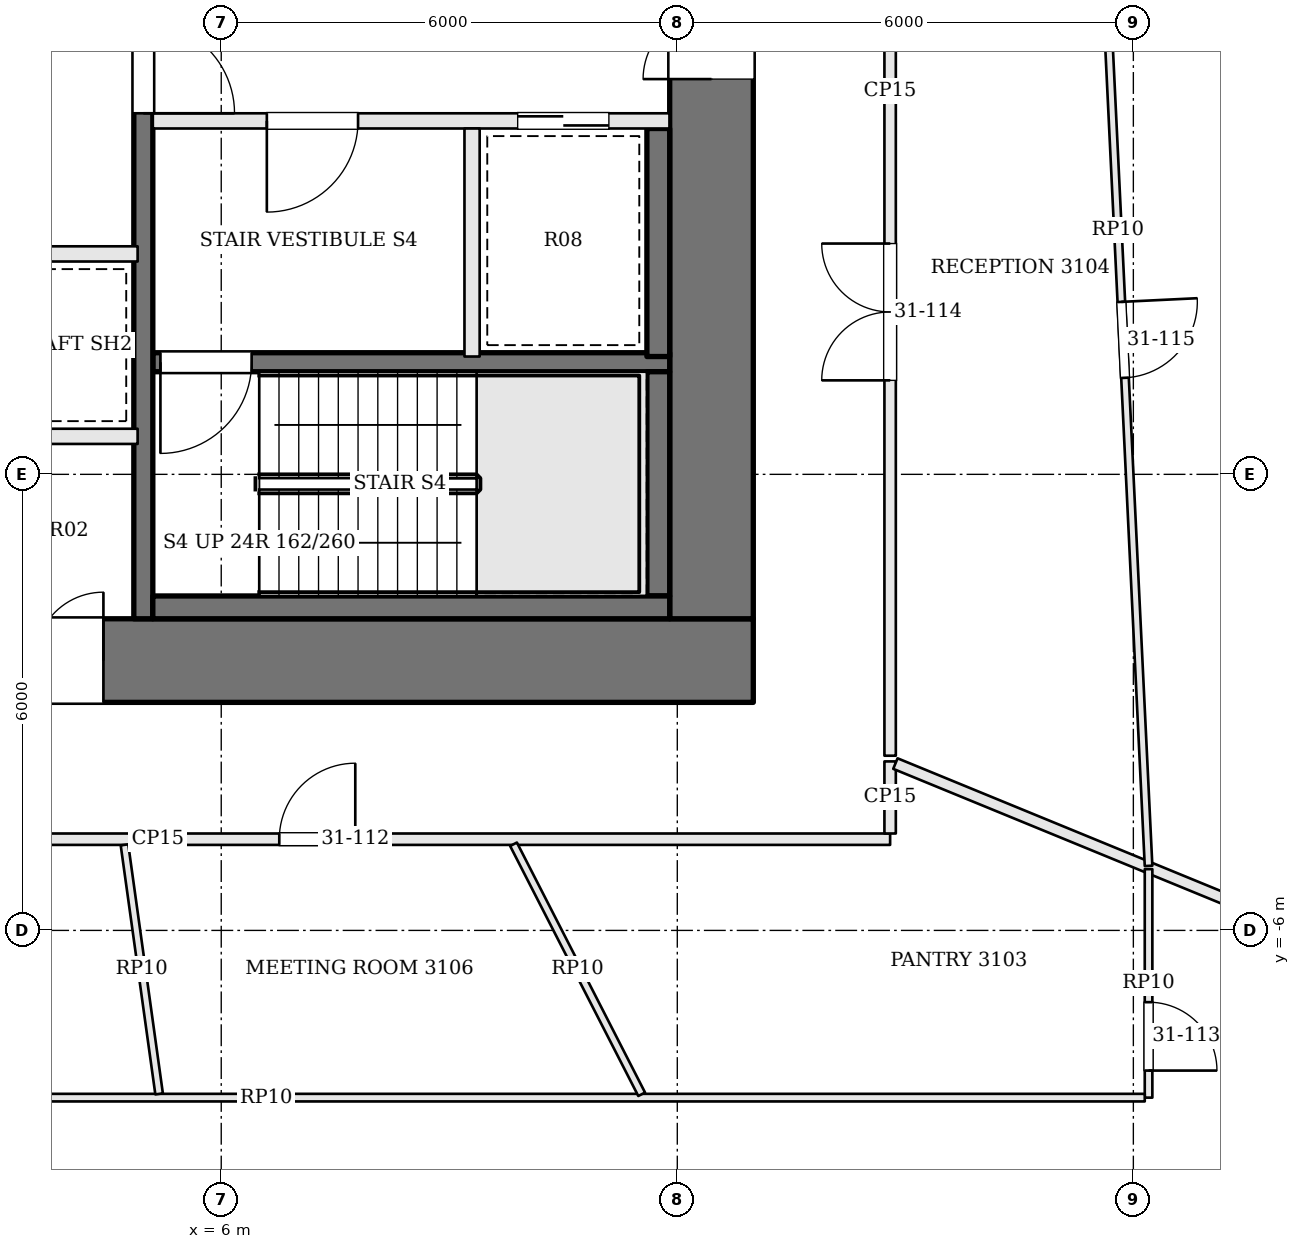
"""IFC4 building model, lengths in metres.
Left out: names, types, materials, properties, quantities, classifications, styles, units other than length and angle.
Written with IfcOpenShell. Run it as: python <this file> out.ifc"""

import sys

from ifc_helpers import new_model, si_unit, direction, frame, frame_2d, origin, place, context, subcontext, project, spatial, rectangle, extrude, element, fill, save


model = new_model("IFC4")
c1 = context("Model", 3, precision=1e-05, world=origin(), true_north=direction((0.0, 1.0)))
c2 = subcontext(c1, "Body", "Model", "MODEL_VIEW")
j1 = project(units=[si_unit("LENGTHUNIT", "METRE"), si_unit("PLANEANGLEUNIT", "RADIAN")], contexts=[c1])
p1 = place(None, origin())
s1 = spatial("IfcSite", under=j1, at=p1, CompositionType="ELEMENT")
p2 = place(p1, origin())
s2 = spatial("IfcBuilding", under=s1, at=p2, CompositionType="ELEMENT")
p3 = place(p2, frame((0.0, 0.0, 130.5)))
s3 = spatial("IfcBuildingStorey", under=s2, at=p3, CompositionType="ELEMENT", Elevation=130.5)
p4 = place(p3, frame((-13.0, -2.45, 0.0), z_axis=(0.0, 0.0, 1.0), x_axis=(1.0, 0.0, 0.0)))
e1 = element("IfcWall", 1, at=p4, inside=s3, PredefinedType="SHEAR", context=c2, shape_type="SweptSolid", body=[
    extrude(rectangle(XDim=26.0, YDim=1.1, at=frame_2d((13.0, 0.0))), origin(), (0.0, 0.0, 1.0), 3.9),
])
p5 = place(p4, frame((9.2, 0.0, 0.0)))
e2 = element("IfcOpeningElement", 2, at=p5, cuts=e1, PredefinedType="OPENING", context=c2, shape_type="SweptSolid", body=[
    extrude(rectangle(XDim=0.9, YDim=2.1, at=frame_2d((0.45, 1.05))), frame((0.0, 0.56, 0.0), z_axis=(0.0, -1.0, 0.0), x_axis=(1.0, 0.0, 0.0)), (0.0, 0.0, 1.0), 1.12),
])
p6 = place(p4, frame((12.3, 0.0, 0.0)))
e3 = element("IfcOpeningElement", 3, at=p6, cuts=e1, PredefinedType="OPENING", context=c2, shape_type="SweptSolid", body=[
    extrude(rectangle(XDim=0.9, YDim=2.1, at=frame_2d((0.45, 1.05))), frame((0.0, 0.56, 0.0), z_axis=(0.0, -1.0, 0.0), x_axis=(1.0, 0.0, 0.0)), (0.0, 0.0, 1.0), 1.12),
])
p7 = place(p4, frame((14.7, 0.0, 0.0)))
e4 = element("IfcOpeningElement", 4, at=p7, cuts=e1, PredefinedType="OPENING", context=c2, shape_type="SweptSolid", body=[
    extrude(rectangle(XDim=1.0, YDim=2.1, at=frame_2d((0.5, 1.05))), frame((0.0, 0.56, 0.0), z_axis=(0.0, -1.0, 0.0), x_axis=(1.0, 0.0, 0.0)), (0.0, 0.0, 1.0), 1.12),
])
p8 = place(p4, frame((16.55, 0.0, 0.0)))
e5 = element("IfcOpeningElement", 5, at=p8, cuts=e1, PredefinedType="OPENING", context=c2, shape_type="SweptSolid", body=[
    extrude(rectangle(XDim=0.9, YDim=2.1, at=frame_2d((0.45, 1.05))), frame((0.0, 0.56, 0.0), z_axis=(0.0, -1.0, 0.0), x_axis=(1.0, 0.0, 0.0)), (0.0, 0.0, 1.0), 1.12),
])
p9 = place(p3, frame((12.45, -1.9, 0.0), z_axis=(0.0, 0.0, 1.0), x_axis=(0.0, 1.0, 0.0)))
e6 = element("IfcWall", 6, at=p9, inside=s3, PredefinedType="SHEAR", context=c2, shape_type="SweptSolid", body=[
    extrude(rectangle(XDim=12.8, YDim=1.1, at=frame_2d((6.4, 0.0))), origin(), (0.0, 0.0, 1.0), 3.9),
])
p10 = place(p9, frame((7.1, 0.0, 0.0)))
e7 = element("IfcOpeningElement", 7, at=p10, cuts=e6, PredefinedType="OPENING", context=c2, shape_type="SweptSolid", body=[
    extrude(rectangle(XDim=1.8, YDim=2.1, at=frame_2d((0.9, 1.05))), frame((0.0, 0.56, 0.0), z_axis=(0.0, -1.0, 0.0), x_axis=(1.0, 0.0, 0.0)), (0.0, 0.0, 1.0), 1.12),
])
p11 = place(p3, frame((11.9, 4.65, 0.0), z_axis=(0.0, 0.0, 1.0), x_axis=(-1.0, 0.0, 0.0)))
e8 = element("IfcWall", 8, at=p11, inside=s3, PredefinedType="SOLIDWALL", context=c2, shape_type="SweptSolid", body=[
    extrude(rectangle(XDim=6.8, YDim=0.2, at=frame_2d((3.4, 0.0))), origin(), (0.0, 0.0, 1.0), 3.7),
])
p12 = place(p11, frame((4.1, 0.0, 0.0)))
e9 = element("IfcOpeningElement", 9, at=p12, cuts=e8, PredefinedType="OPENING", context=c2, shape_type="SweptSolid", body=[
    extrude(rectangle(XDim=1.2, YDim=2.1, at=frame_2d((0.6, 1.05))), frame((0.0, 0.11, 0.0), z_axis=(0.0, -1.0, 0.0), x_axis=(1.0, 0.0, 0.0)), (0.0, 0.0, 1.0), 0.22),
])
p13 = place(p11, frame((0.8, 0.0, 0.0)))
e10 = element("IfcOpeningElement", 10, at=p13, cuts=e8, PredefinedType="OPENING", context=c2, shape_type="SweptSolid", body=[
    extrude(rectangle(XDim=1.2, YDim=2.1, at=frame_2d((0.6, 1.05))), frame((0.0, 0.11, 0.0), z_axis=(0.0, -1.0, 0.0), x_axis=(1.0, 0.0, 0.0)), (0.0, 0.0, 1.0), 0.22),
])
p14 = place(p3, frame((11.9, 1.475, 0.0), z_axis=(0.0, 0.0, 1.0), x_axis=(-1.0, 0.0, 0.0)))
e11 = element("IfcWall", 11, at=p14, inside=s3, PredefinedType="SOLIDWALL", context=c2, shape_type="SweptSolid", body=[
    extrude(rectangle(XDim=6.8, YDim=0.25, at=frame_2d((3.4, 0.0))), origin(), (0.0, 0.0, 1.0), 3.7),
])
p15 = place(p14, frame((5.5, 0.0, 0.0)))
e12 = element("IfcOpeningElement", 12, at=p15, cuts=e11, PredefinedType="OPENING", context=c2, shape_type="SweptSolid", body=[
    extrude(rectangle(XDim=1.2, YDim=2.1, at=frame_2d((0.6, 1.05))), frame((0.0, 0.135, 0.0), z_axis=(0.0, -1.0, 0.0), x_axis=(1.0, 0.0, 0.0)), (0.0, 0.0, 1.0), 0.27),
])
p16 = place(p3, frame((9.3, 4.55, 0.0), z_axis=(0.0, 0.0, 1.0), x_axis=(0.0, -1.0, 0.0)))
e13 = element("IfcWall", 13, at=p16, inside=s3, PredefinedType="SOLIDWALL", context=c2, shape_type="SweptSolid", body=[
    extrude(rectangle(XDim=3.0, YDim=0.2, at=frame_2d((1.5, 0.0))), origin(), (0.0, 0.0, 1.0), 3.7),
])
p17 = place(p3, frame((4.975, 10.9, 0.0), z_axis=(0.0, 0.0, 1.0), x_axis=(0.0, -1.0, 0.0)))
e14 = element("IfcWall", 14, at=p17, inside=s3, PredefinedType="SOLIDWALL", context=c2, shape_type="SweptSolid", body=[
    extrude(rectangle(XDim=12.8, YDim=0.25, at=frame_2d((6.4, 0.0))), origin(), (0.0, 0.0, 1.0), 3.7),
])
p18 = place(p17, frame((4.95, 0.0, 0.0)))
e15 = element("IfcOpeningElement", 15, at=p18, cuts=e14, PredefinedType="OPENING", context=c2, shape_type="SweptSolid", body=[
    extrude(rectangle(XDim=1.2, YDim=2.1, at=frame_2d((0.6, 1.05))), frame((0.0, 0.135, 0.0), z_axis=(0.0, -1.0, 0.0), x_axis=(1.0, 0.0, 0.0)), (0.0, 0.0, 1.0), 0.27),
])
p19 = place(p3, frame((11.75, 4.55, 0.0), z_axis=(0.0, 0.0, 1.0), x_axis=(0.0, -1.0, 0.0)))
e16 = element("IfcWall", 16, at=p19, inside=s3, PredefinedType="SOLIDWALL", context=c2, shape_type="SweptSolid", body=[
    extrude(rectangle(XDim=3.0, YDim=0.3, at=frame_2d((1.5, 0.0))), origin(), (0.0, 0.0, 1.0), 3.7),
])
p20 = place(p3, frame((11.75, 1.35, 0.0), z_axis=(0.0, 0.0, 1.0), x_axis=(0.0, -1.0, 0.0)))
e17 = element("IfcWall", 17, at=p20, inside=s3, PredefinedType="SOLIDWALL", context=c2, shape_type="SweptSolid", body=[
    extrude(rectangle(XDim=2.95, YDim=0.3, at=frame_2d((1.475, 0.0))), origin(), (0.0, 0.0, 1.0), 3.7),
])
p21 = place(p3, frame((11.9, -1.75, 0.0), z_axis=(0.0, 0.0, 1.0), x_axis=(-1.0, 0.0, 0.0)))
e18 = element("IfcWall", 18, at=p21, inside=s3, PredefinedType="SOLIDWALL", context=c2, shape_type="SweptSolid", body=[
    extrude(rectangle(XDim=6.8, YDim=0.3, at=frame_2d((3.4, 0.0))), origin(), (0.0, 0.0, 1.0), 3.7),
])
p22 = place(p3, frame((-4.9, 0.5, 0.0), z_axis=(0.0, 0.0, 1.0), x_axis=(1.0, 0.0, 0.0)))
e19 = element("IfcWall", 19, at=p22, inside=s3, PredefinedType="SOLIDWALL", context=c2, shape_type="SweptSolid", body=[
    extrude(rectangle(XDim=9.8, YDim=0.2, at=frame_2d((4.9, 0.0))), origin(), (0.0, 0.0, 1.0), 3.7),
])
p23 = place(p3, frame((-4.9, 2.9, 0.0), z_axis=(0.0, 0.0, 1.0), x_axis=(1.0, 0.0, 0.0)))
e20 = element("IfcWall", 20, at=p23, inside=s3, PredefinedType="SOLIDWALL", context=c2, shape_type="SweptSolid", body=[
    extrude(rectangle(XDim=9.8, YDim=0.2, at=frame_2d((4.9, 0.0))), origin(), (0.0, 0.0, 1.0), 3.7),
])
p24 = place(p23, frame((0.675, 0.0, 0.0)))
e21 = element("IfcOpeningElement", 21, at=p24, cuts=e20, PredefinedType="OPENING", context=c2, shape_type="SweptSolid", body=[
    extrude(rectangle(XDim=1.1, YDim=2.1, at=frame_2d((0.55, 1.05))), frame((0.0, 0.11, 0.0), z_axis=(0.0, -1.0, 0.0), x_axis=(1.0, 0.0, 0.0)), (0.0, 0.0, 1.0), 0.22),
])
p25 = place(p23, frame((3.175, 0.0, 0.0)))
e22 = element("IfcOpeningElement", 22, at=p25, cuts=e20, PredefinedType="OPENING", context=c2, shape_type="SweptSolid", body=[
    extrude(rectangle(XDim=1.0, YDim=2.1, at=frame_2d((0.5, 1.05))), frame((0.0, 0.11, 0.0), z_axis=(0.0, -1.0, 0.0), x_axis=(1.0, 0.0, 0.0)), (0.0, 0.0, 1.0), 0.22),
])
p26 = place(p3, frame((-4.465, -4.8, 0.0), z_axis=(0.0, 0.0, 1.0), x_axis=(1.0, 0.0, 0.0)))
e23 = element("IfcWall", 23, at=p26, inside=s3, PredefinedType="PARTITIONING", context=c2, shape_type="SweptSolid", body=[
    extrude(rectangle(XDim=19.265, YDim=0.15, at=frame_2d((9.633, 0.0))), origin(), (0.0, 0.0, 1.0), 3.198),
])
p27 = place(p26, frame((3.654, 0.0, 0.0)))
e24 = element("IfcOpeningElement", 24, at=p27, cuts=e23, PredefinedType="OPENING", context=c2, shape_type="SweptSolid", body=[
    extrude(rectangle(XDim=1.8, YDim=2.1, at=frame_2d((0.9, 1.05))), frame((0.0, 0.085, 0.0), z_axis=(0.0, -1.0, 0.0), x_axis=(1.0, 0.0, 0.0)), (0.0, 0.0, 1.0), 0.17),
])
p28 = place(p26, frame((11.229, 0.0, 0.0)))
e25 = element("IfcOpeningElement", 25, at=p28, cuts=e23, PredefinedType="OPENING", context=c2, shape_type="SweptSolid", body=[
    extrude(rectangle(XDim=1.0, YDim=2.4, at=frame_2d((0.5, 1.2))), frame((0.0, 0.085, 0.0), z_axis=(0.0, -1.0, 0.0), x_axis=(1.0, 0.0, 0.0)), (0.0, 0.0, 1.0), 0.17),
])
p29 = place(p3, frame((14.8, -4.725, 0.0), z_axis=(0.0, 0.0, 1.0), x_axis=(0.0, 1.0, 0.0)))
e26 = element("IfcWall", 26, at=p29, inside=s3, PredefinedType="PARTITIONING", context=c2, shape_type="SweptSolid", body=[
    extrude(rectangle(XDim=0.948, YDim=0.15, at=frame_2d((0.474, 0.0))), origin(), (0.0, 0.0, 1.0), 3.198),
])
p30 = place(p3, frame((25.931, -8.346, 0.0), z_axis=(0.0, 0.0, 1.0), x_axis=(-0.92507887737, 0.379775026355, 0.0)))
e27 = element("IfcWall", 27, at=p30, inside=s3, PredefinedType="PARTITIONING", context=c2, shape_type="SweptSolid", body=[
    extrude(rectangle(XDim=11.957, YDim=0.15, at=frame_2d((5.979, 0.0))), origin(), (0.0, 0.0, 1.0), 3.198),
])
p31 = place(p3, frame((14.8, -3.702, 0.0), z_axis=(0.0, 0.0, 1.0), x_axis=(0.0, 1.0, 0.0)))
e28 = element("IfcWall", 28, at=p31, inside=s3, PredefinedType="PARTITIONING", context=c2, shape_type="SweptSolid", body=[
    extrude(rectangle(XDim=17.502, YDim=0.15, at=frame_2d((8.751, 0.0))), origin(), (0.0, 0.0, 1.0), 3.198),
])
p32 = place(p31, frame((4.938, 0.0, 0.0)))
e29 = element("IfcOpeningElement", 29, at=p32, cuts=e28, PredefinedType="OPENING", context=c2, shape_type="SweptSolid", body=[
    extrude(rectangle(XDim=1.8, YDim=2.1, at=frame_2d((0.9, 1.05))), frame((0.0, 0.085, 0.0), z_axis=(0.0, -1.0, 0.0), x_axis=(1.0, 0.0, 0.0)), (0.0, 0.0, 1.0), 0.17),
])
p33 = place(p31, frame((13.9, 0.0, 0.0)))
e30 = element("IfcOpeningElement", 30, at=p33, cuts=e28, PredefinedType="OPENING", context=c2, shape_type="SweptSolid", body=[
    extrude(rectangle(XDim=1.0, YDim=2.4, at=frame_2d((0.5, 1.2))), frame((0.0, 0.085, 0.0), z_axis=(0.0, -1.0, 0.0), x_axis=(1.0, 0.0, 0.0)), (0.0, 0.0, 1.0), 0.17),
])
p34 = place(p3, frame((18.2, -5.194, 0.0), z_axis=(0.0, 0.0, 1.0), x_axis=(0.0, -1.0, 0.0)))
e31 = element("IfcWall", 31, at=p34, inside=s3, PredefinedType="PARTITIONING", context=c2, shape_type="SweptSolid", body=[
    extrude(rectangle(XDim=3.006, YDim=0.1, at=frame_2d((1.503, 0.0))), origin(), (0.0, 0.0, 1.0), 3.184),
])
p35 = place(p34, frame((1.75, 0.0, 0.0)))
e32 = element("IfcOpeningElement", 32, at=p35, cuts=e31, PredefinedType="OPENING", context=c2, shape_type="SweptSolid", body=[
    extrude(rectangle(XDim=0.9, YDim=2.1, at=frame_2d((0.45, 1.05))), frame((0.0, 0.06, 0.0), z_axis=(0.0, -1.0, 0.0), x_axis=(1.0, 0.0, 0.0)), (0.0, 0.0, 1.0), 0.12),
])
p36 = place(p3, frame((18.15, -8.2, 0.0), z_axis=(0.0, 0.0, 1.0), x_axis=(-1.0, 0.0, 0.0)))
e33 = element("IfcWall", 33, at=p36, inside=s3, PredefinedType="PARTITIONING", context=c2, shape_type="SweptSolid", body=[
    extrude(rectangle(XDim=23.115, YDim=0.1, at=frame_2d((11.557, 0.0))), origin(), (0.0, 0.0, 1.0), 3.184),
])
p37 = place(p36, frame((17.123, 0.0, 0.0)))
e34 = element("IfcOpeningElement", 34, at=p37, cuts=e33, PredefinedType="OPENING", context=c2, shape_type="SweptSolid", body=[
    extrude(rectangle(XDim=1.0, YDim=2.1, at=frame_2d((0.5, 1.05))), frame((0.0, 0.06, 0.0), z_axis=(0.0, -1.0, 0.0), x_axis=(1.0, 0.0, 0.0)), (0.0, 0.0, 1.0), 0.12),
])
p38 = place(p3, frame((4.727, -4.874, 0.0), z_axis=(0.0, 0.0, 1.0), x_axis=(0.13773130116, -0.990469630368, 0.0)))
e35 = element("IfcWall", 35, at=p38, inside=s3, PredefinedType="PARTITIONING", context=c2, shape_type="SweptSolid", body=[
    extrude(rectangle(XDim=3.308, YDim=0.1, at=frame_2d((1.654, 0.0))), origin(), (0.0, 0.0, 1.0), 3.184),
])
p39 = place(p3, frame((9.845, -4.867, 0.0), z_axis=(0.0, 0.0, 1.0), x_axis=(0.456148994618, -0.889903418754, 0.0)))
e36 = element("IfcWall", 36, at=p39, inside=s3, PredefinedType="PARTITIONING", context=c2, shape_type="SweptSolid", body=[
    extrude(rectangle(XDim=3.696, YDim=0.1, at=frame_2d((1.848, 0.0))), origin(), (0.0, 0.0, 1.0), 3.184),
])
p40 = place(p3, frame((17.393, 11.569, 0.0), z_axis=(0.0, 0.0, 1.0), x_axis=(0.048202645711, -0.998837576859, 0.0)))
e37 = element("IfcWall", 37, at=p40, inside=s3, PredefinedType="PARTITIONING", context=c2, shape_type="SweptSolid", body=[
    extrude(rectangle(XDim=16.74, YDim=0.1, at=frame_2d((8.37, 0.0))), origin(), (0.0, 0.0, 1.0), 3.184),
])
p41 = place(p40, frame((9.311, 0.0, 0.0)))
e38 = element("IfcOpeningElement", 38, at=p41, cuts=e37, PredefinedType="OPENING", context=c2, shape_type="SweptSolid", body=[
    extrude(rectangle(XDim=1.0, YDim=2.1, at=frame_2d((0.5, 1.05))), frame((0.0, 0.06, 0.0), z_axis=(0.0, -1.0, 0.0), x_axis=(1.0, 0.0, 0.0)), (0.0, 0.0, 1.0), 0.12),
])
p42 = place(p10, origin())
e39 = element("IfcDoor", 39, at=p42, inside=s3, OperationType="DOUBLE_DOOR_SINGLE_SWING", PredefinedType="DOOR", context=c2, shape_type="SweptSolid", body=[
    extrude(rectangle(XDim=1.8, YDim=2.1, at=frame_2d((0.9, 1.05))), frame((0.0, 0.025, 0.0), z_axis=(0.0, -1.0, 0.0), x_axis=(1.0, 0.0, 0.0)), (0.0, 0.0, 1.0), 0.05),
])
fill(e7, e39)
p43 = place(p18, origin())
e40 = element("IfcDoor", 40, at=p43, inside=s3, OperationType="SINGLE_SWING_RIGHT", PredefinedType="DOOR", context=c2, shape_type="SweptSolid", body=[
    extrude(rectangle(XDim=1.2, YDim=2.1, at=frame_2d((0.6, 1.05))), frame((0.0, 0.025, 0.0), z_axis=(0.0, -1.0, 0.0), x_axis=(1.0, 0.0, 0.0)), (0.0, 0.0, 1.0), 0.05),
])
fill(e15, e40)
p44 = place(p12, origin())
e41 = element("IfcDoor", 41, at=p44, inside=s3, OperationType="SINGLE_SWING_RIGHT", PredefinedType="DOOR", context=c2, shape_type="SweptSolid", body=[
    extrude(rectangle(XDim=1.2, YDim=2.1, at=frame_2d((0.6, 1.05))), frame((0.0, 0.025, 0.0), z_axis=(0.0, -1.0, 0.0), x_axis=(1.0, 0.0, 0.0)), (0.0, 0.0, 1.0), 0.05),
])
fill(e9, e41)
p45 = place(p15, origin())
e42 = element("IfcDoor", 42, at=p45, inside=s3, OperationType="SINGLE_SWING_RIGHT", PredefinedType="DOOR", context=c2, shape_type="SweptSolid", body=[
    extrude(rectangle(XDim=1.2, YDim=2.1, at=frame_2d((0.6, 1.05))), frame((0.0, 0.025, 0.0), z_axis=(0.0, -1.0, 0.0), x_axis=(1.0, 0.0, 0.0)), (0.0, 0.0, 1.0), 0.05),
])
fill(e12, e42)
p46 = place(p13, origin())
e43 = element("IfcDoor", 43, at=p46, inside=s3, OperationType="SLIDING_TO_RIGHT", PredefinedType="DOOR", context=c2, shape_type="SweptSolid", body=[
    extrude(rectangle(XDim=1.2, YDim=2.1, at=frame_2d((0.6, 1.05))), frame((0.0, 0.025, 0.0), z_axis=(0.0, -1.0, 0.0), x_axis=(1.0, 0.0, 0.0)), (0.0, 0.0, 1.0), 0.05),
])
fill(e10, e43)
p47 = place(p8, origin())
e44 = element("IfcDoor", 44, at=p47, inside=s3, OperationType="SINGLE_SWING_RIGHT", PredefinedType="DOOR", context=c2, shape_type="SweptSolid", body=[
    extrude(rectangle(XDim=0.9, YDim=2.1, at=frame_2d((0.45, 1.05))), frame((0.0, 0.025, 0.0), z_axis=(0.0, -1.0, 0.0), x_axis=(1.0, 0.0, 0.0)), (0.0, 0.0, 1.0), 0.05),
])
fill(e5, e44)
p48 = place(p28, origin())
e45 = element("IfcDoor", 45, at=p48, inside=s3, OperationType="SINGLE_SWING_RIGHT", PredefinedType="DOOR", context=c2, shape_type="SweptSolid", body=[
    extrude(rectangle(XDim=1.0, YDim=2.4, at=frame_2d((0.5, 1.2))), frame((0.0, 0.025, 0.0), z_axis=(0.0, -1.0, 0.0), x_axis=(1.0, 0.0, 0.0)), (0.0, 0.0, 1.0), 0.05),
])
fill(e25, e45)
p49 = place(p35, origin())
e46 = element("IfcDoor", 46, at=p49, inside=s3, OperationType="SINGLE_SWING_RIGHT", PredefinedType="DOOR", context=c2, shape_type="SweptSolid", body=[
    extrude(rectangle(XDim=0.9, YDim=2.1, at=frame_2d((0.45, 1.05))), frame((0.0, 0.025, 0.0), z_axis=(0.0, -1.0, 0.0), x_axis=(1.0, 0.0, 0.0)), (0.0, 0.0, 1.0), 0.05),
])
fill(e32, e46)
p50 = place(p32, origin())
e47 = element("IfcDoor", 47, at=p50, inside=s3, OperationType="DOUBLE_DOOR_SINGLE_SWING", PredefinedType="DOOR", context=c2, shape_type="SweptSolid", body=[
    extrude(rectangle(XDim=1.8, YDim=2.1, at=frame_2d((0.9, 1.05))), frame((0.0, 0.025, 0.0), z_axis=(0.0, -1.0, 0.0), x_axis=(1.0, 0.0, 0.0)), (0.0, 0.0, 1.0), 0.05),
])
fill(e29, e47)
p51 = place(p41, origin())
e48 = element("IfcDoor", 48, at=p51, inside=s3, OperationType="SINGLE_SWING_LEFT", PredefinedType="DOOR", context=c2, shape_type="SweptSolid", body=[
    extrude(rectangle(XDim=1.0, YDim=2.1, at=frame_2d((0.5, 1.05))), frame((0.0, 0.025, 0.0), z_axis=(0.0, -1.0, 0.0), x_axis=(1.0, 0.0, 0.0)), (0.0, 0.0, 1.0), 0.05),
])
fill(e38, e48)
save(model, sys.argv[1])
